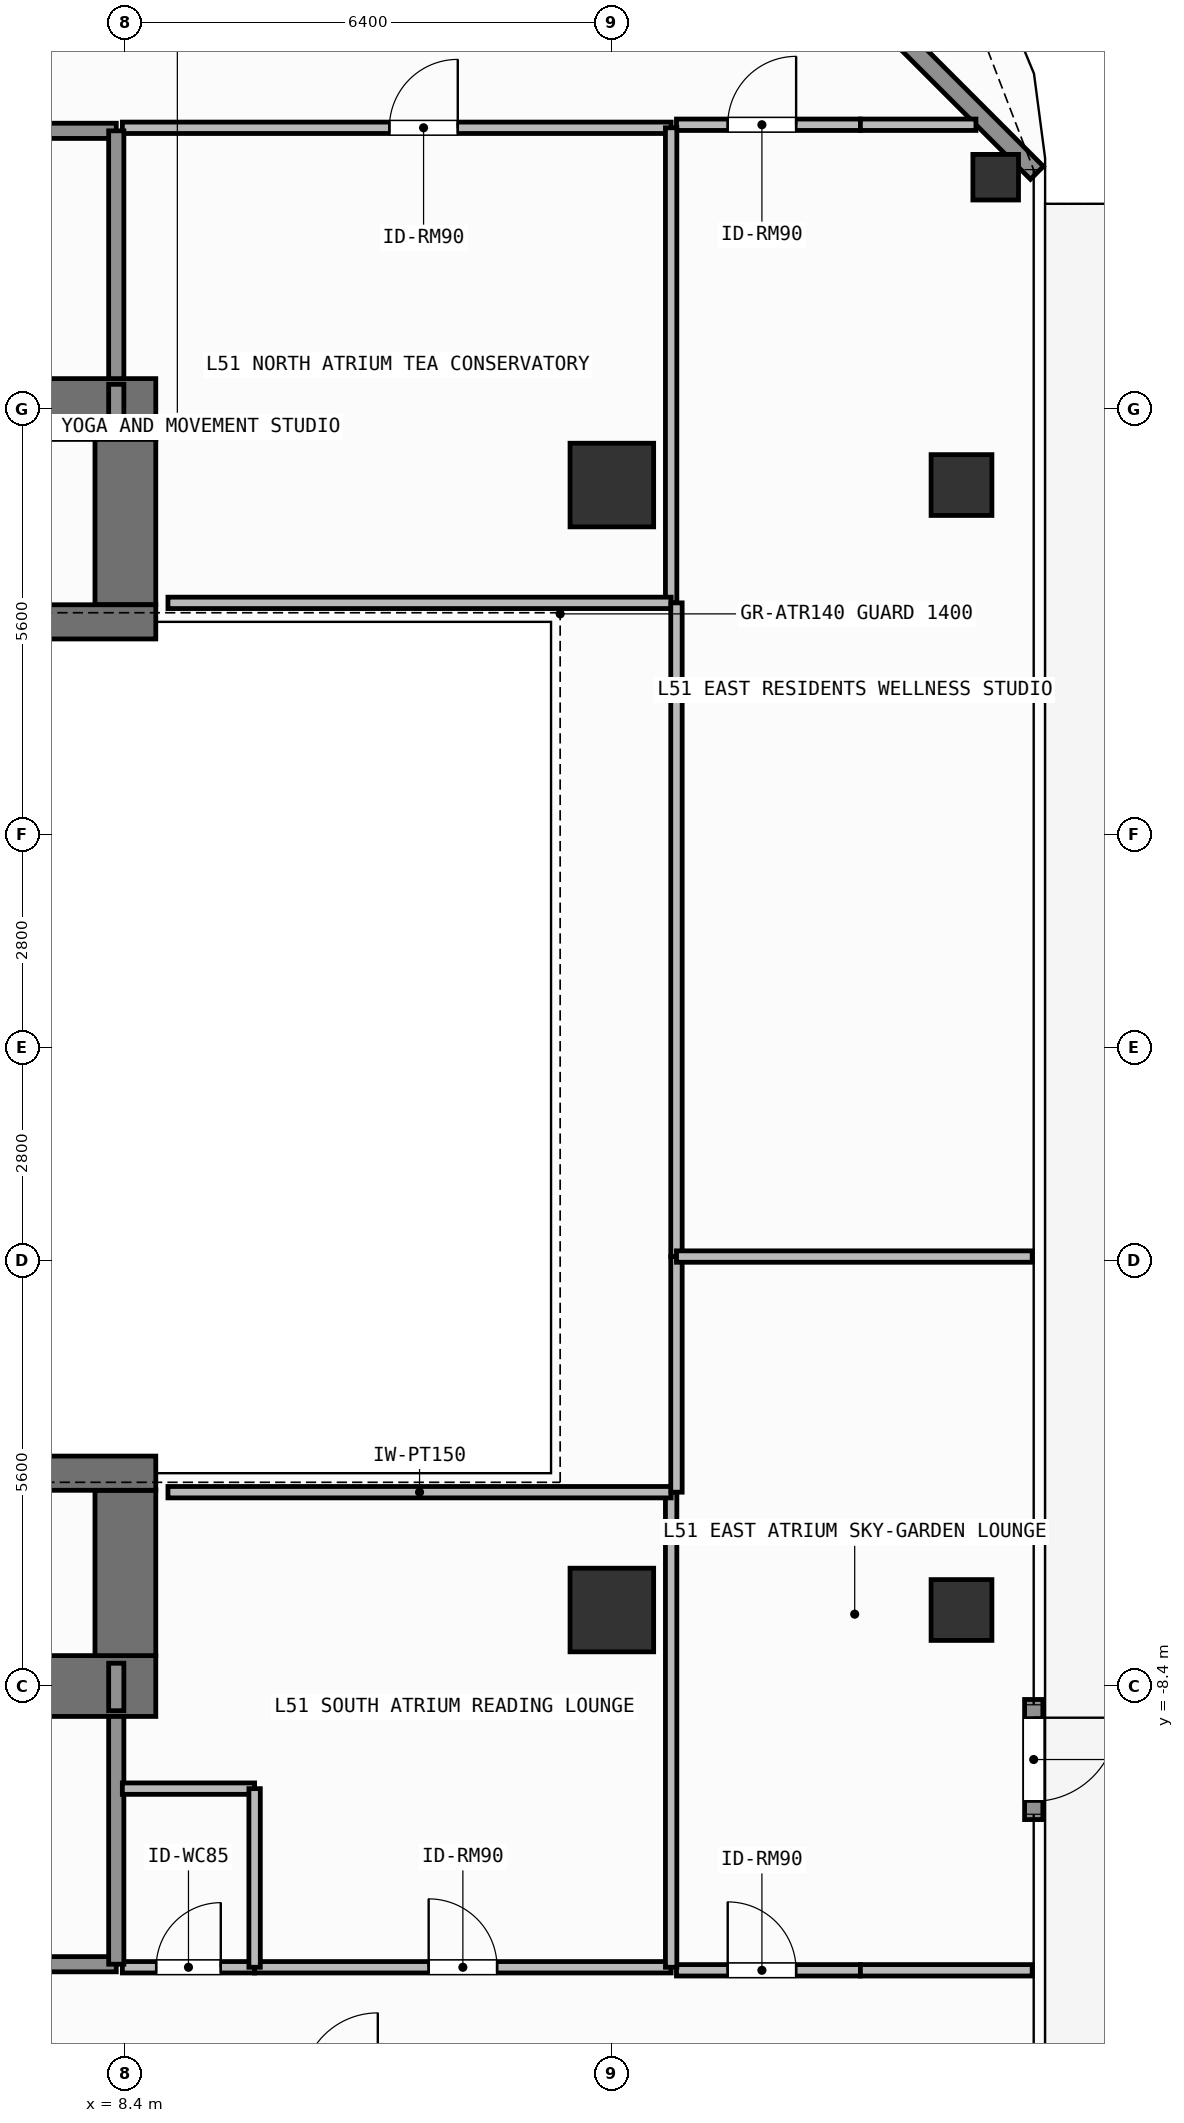
"""IFC4 building model, lengths in metres.
Left out: names, types, materials, properties, quantities, classifications, styles, units other than length and angle.
Written with IfcOpenShell. Run it as: python <this file> out.ifc"""

import sys

from ifc_helpers import new_model, si_unit, direction, frame, frame_2d, origin, origin_2d, place, context, subcontext, project, spatial, rectangle, hollow_rectangle, extrude, element, fill, save


model = new_model("IFC4")
c1 = context("Model", 3, precision=1e-05, world=origin(), true_north=direction((0.0, 1.0)))
c2 = subcontext(c1, "Body", "Model", "MODEL_VIEW")
j1 = project(units=[si_unit("LENGTHUNIT", "METRE"), si_unit("PLANEANGLEUNIT", "RADIAN")], contexts=[c1])
p1 = place(None, origin())
s1 = spatial("IfcSite", under=j1, at=p1, CompositionType="ELEMENT")
p2 = place(p1, origin())
s2 = spatial("IfcBuilding", under=s1, at=p2, CompositionType="ELEMENT")
p3 = place(p2, frame((0.0, 0.0, 207.0)))
s3 = spatial("IfcBuildingStorey", under=s2, at=p3, CompositionType="ELEMENT", Elevation=207.0)
p4 = place(p3, frame((6.12, -8.4, 0.0), z_axis=(0.0, 0.0, 1.0), x_axis=(1.0, 0.0, 0.0)))
e1 = element("IfcWall", 1, at=p4, inside=s3, PredefinedType="SHEAR", context=c2, shape_type="SweptSolid", body=[
    extrude(rectangle(XDim=2.68, YDim=0.8, at=frame_2d((1.34, 0.0))), origin(), (0.0, 0.0, 1.0), 3.9),
])
p5 = place(p3, frame((-7.55, 8.4, 0.0), z_axis=(0.0, 0.0, 1.0), x_axis=(1.0, 0.0, 0.0)))
e2 = element("IfcWall", 2, at=p5, inside=s3, PredefinedType="SHEAR", context=c2, shape_type="SweptSolid", body=[
    extrude(rectangle(XDim=16.35, YDim=0.8, at=frame_2d((8.175, 0.0))), origin(), (0.0, 0.0, 1.0), 3.9),
])
for number, where, z_axis, x_axis in (
    (3, (8.4, -8.0, 0.0), (0.0, 0.0, 1.0), (0.0, 1.0, 0.0)),
    (4, (8.4, 5.825, 0.0), (0.0, 0.0, 1.0), (0.0, 1.0, 0.0)),
):
    element("IfcWall", number, at=place(p3, frame(where, z_axis=z_axis, x_axis=x_axis)), inside=s3, PredefinedType="SHEAR", context=c2, shape_type="SweptSolid", body=[
        extrude(rectangle(XDim=2.175, YDim=0.8, at=frame_2d((1.087, 0.0))), origin(), (0.0, 0.0, 1.0), 3.9),
    ])
for number, where, z_axis, x_axis in (
    (5, (3.045, -5.6, 0.0), (0.0, 0.0, 1.0), (1.0, 0.0, 0.0)),
    (6, (3.045, 5.6, 0.0), (0.0, 0.0, 1.0), (1.0, 0.0, 0.0)),
):
    element("IfcWall", number, at=place(p3, frame(where, z_axis=z_axis, x_axis=x_axis)), inside=s3, PredefinedType="SHEAR", context=c2, shape_type="SweptSolid", body=[
        extrude(rectangle(XDim=5.755, YDim=0.45, at=frame_2d((2.877, 0.0))), origin(), (0.0, 0.0, 1.0), 3.9),
    ])
for number, where, z_axis, x_axis in (
    (7, (14.8, -7.4, 0.0), (0.0, 0.0, 1.0), (1.0, 0.0, 0.0)),
    (8, (14.8, 7.4, 0.0), (0.0, 0.0, 1.0), (1.0, 0.0, 0.0)),
):
    element("IfcColumn", number, at=place(p3, frame(where, z_axis=z_axis, x_axis=x_axis)), inside=s3, PredefinedType="COLUMN", context=c2, shape_type="SweptSolid", body=[
        extrude(rectangle(XDim=1.1, YDim=1.1, at=origin_2d()), origin(), (0.0, 0.0, 1.0), 3.9),
    ])
for number, where, z_axis, x_axis in (
    (9, (19.4, -7.4, 0.0), (0.0, 0.0, 1.0), (1.0, 0.0, 0.0)),
    (10, (19.4, 7.4, 0.0), (0.0, 0.0, 1.0), (1.0, 0.0, 0.0)),
):
    element("IfcColumn", number, at=place(p3, frame(where, z_axis=z_axis, x_axis=x_axis)), inside=s3, PredefinedType="COLUMN", context=c2, shape_type="SweptSolid", body=[
        extrude(hollow_rectangle(XDim=0.8, YDim=0.8, WallThickness=0.036, at=origin_2d()), origin(), (0.0, 0.0, 1.0), 3.9),
    ])
p6 = place(p3, frame((19.85, 11.45, 0.0), z_axis=(0.0, 0.0, 1.0), x_axis=(1.0, 0.0, 0.0)))
e11 = element("IfcColumn", 11, at=p6, inside=s3, PredefinedType="COLUMN", context=c2, shape_type="SweptSolid", body=[
    extrude(hollow_rectangle(XDim=0.6, YDim=0.6, WallThickness=0.028, at=origin_2d()), origin(), (0.0, 0.0, 1.0), 3.9),
])
p7 = place(p3, frame((20.35, -8.577, 0.0), z_axis=(0.0, 0.0, 1.0), x_axis=(0.0, -1.0, 0.0)))
e12 = element("IfcWall", 12, at=p7, inside=s3, PredefinedType="SOLIDWALL", context=c2, shape_type="SweptSolid", body=[
    extrude(rectangle(XDim=1.58, YDim=0.24, at=frame_2d((0.79, 0.0))), origin(), (0.0, 0.0, 1.0), 3.62),
])
p8 = place(p7, frame((0.24, 0.0, 0.0)))
e13 = element("IfcOpeningElement", 13, at=p8, cuts=e12, PredefinedType="OPENING", context=c2, shape_type="SweptSolid", body=[
    extrude(rectangle(XDim=1.1, YDim=2.2, at=frame_2d((0.55, 1.1))), frame((0.0, 0.13, 0.0), z_axis=(0.0, -1.0, 0.0), x_axis=(1.0, 0.0, 0.0)), (0.0, 0.0, 1.0), 0.26),
])
p9 = place(p3, frame((16.008, 15.892, 0.0), z_axis=(0.0, 0.0, 1.0), x_axis=(0.707106781187, -0.707106781187, 0.0)))
e14 = element("IfcWall", 14, at=p9, inside=s3, PredefinedType="SOLIDWALL", context=c2, shape_type="SweptSolid", body=[
    extrude(rectangle(XDim=6.201, YDim=0.24, at=frame_2d((3.101, 0.0))), origin(), (0.0, 0.0, 1.0), 3.62),
])
p10 = place(p3, frame((4.58, -12.06, 0.0), z_axis=(0.0, 0.0, 1.0), x_axis=(1.0, 0.0, 0.0)))
e15 = element("IfcWall", 15, at=p10, inside=s3, PredefinedType="SOLIDWALL", context=c2, shape_type="SweptSolid", body=[
    extrude(rectangle(XDim=3.7, YDim=0.2, at=frame_2d((1.85, 0.0))), origin(), (0.0, 0.0, 1.0), 3.62),
])
p11 = place(p10, frame((1.212, 0.0, 0.0)))
e16 = element("IfcOpeningElement", 16, at=p11, cuts=e15, PredefinedType="OPENING", context=c2, shape_type="SweptSolid", body=[
    extrude(rectangle(XDim=1.1, YDim=2.15, at=frame_2d((0.55, 1.075))), frame((0.0, 0.11, 0.0), z_axis=(0.0, -1.0, 0.0), x_axis=(1.0, 0.0, 0.0)), (0.0, 0.0, 1.0), 0.22),
])
p12 = place(p3, frame((4.58, 12.06, 0.0), z_axis=(0.0, 0.0, 1.0), x_axis=(1.0, 0.0, 0.0)))
e17 = element("IfcWall", 17, at=p12, inside=s3, PredefinedType="SOLIDWALL", context=c2, shape_type="SweptSolid", body=[
    extrude(rectangle(XDim=3.7, YDim=0.2, at=frame_2d((1.85, 0.0))), origin(), (0.0, 0.0, 1.0), 3.62),
])
p13 = place(p12, frame((1.212, 0.0, 0.0)))
e18 = element("IfcOpeningElement", 18, at=p13, cuts=e17, PredefinedType="OPENING", context=c2, shape_type="SweptSolid", body=[
    extrude(rectangle(XDim=1.1, YDim=2.15, at=frame_2d((0.55, 1.075))), frame((0.0, 0.11, 0.0), z_axis=(0.0, -1.0, 0.0), x_axis=(1.0, 0.0, 0.0)), (0.0, 0.0, 1.0), 0.22),
])
p14 = place(p3, frame((8.36, -12.1, 0.0), z_axis=(0.0, 0.0, 1.0), x_axis=(1.0, 0.0, 0.0)))
e19 = element("IfcWall", 19, at=p14, inside=s3, PredefinedType="PARTITIONING", context=c2, shape_type="SweptSolid", body=[
    extrude(rectangle(XDim=1.74, YDim=0.15, at=frame_2d((0.87, 0.0))), origin(), (0.0, 0.0, 1.0), 3.62),
])
p15 = place(p14, frame((0.445, 0.0, 0.0)))
e20 = element("IfcOpeningElement", 20, at=p15, cuts=e19, PredefinedType="OPENING", context=c2, shape_type="SweptSolid", body=[
    extrude(rectangle(XDim=0.85, YDim=2.1, at=frame_2d((0.425, 1.05))), frame((0.0, 0.085, 0.0), z_axis=(0.0, -1.0, 0.0), x_axis=(1.0, 0.0, 0.0)), (0.0, 0.0, 1.0), 0.17),
])
p16 = place(p3, frame((10.1, -12.1, 0.0), z_axis=(0.0, 0.0, 1.0), x_axis=(1.0, 0.0, 0.0)))
e21 = element("IfcWall", 21, at=p16, inside=s3, PredefinedType="PARTITIONING", context=c2, shape_type="SweptSolid", body=[
    extrude(rectangle(XDim=5.48, YDim=0.15, at=frame_2d((2.74, 0.0))), origin(), (0.0, 0.0, 1.0), 3.62),
])
p17 = place(p16, frame((2.29, 0.0, 0.0)))
e22 = element("IfcOpeningElement", 22, at=p17, cuts=e21, PredefinedType="OPENING", context=c2, shape_type="SweptSolid", body=[
    extrude(rectangle(XDim=0.9, YDim=2.1, at=frame_2d((0.45, 1.05))), frame((0.0, 0.085, 0.0), z_axis=(0.0, -1.0, 0.0), x_axis=(1.0, 0.0, 0.0)), (0.0, 0.0, 1.0), 0.17),
])
p18 = place(p3, frame((8.36, 12.1, 0.0), z_axis=(0.0, 0.0, 1.0), x_axis=(1.0, 0.0, 0.0)))
e23 = element("IfcWall", 23, at=p18, inside=s3, PredefinedType="PARTITIONING", context=c2, shape_type="SweptSolid", body=[
    extrude(rectangle(XDim=7.22, YDim=0.15, at=frame_2d((3.61, 0.0))), origin(), (0.0, 0.0, 1.0), 3.62),
])
p19 = place(p18, frame((3.513, 0.0, 0.0)))
e24 = element("IfcOpeningElement", 24, at=p19, cuts=e23, PredefinedType="OPENING", context=c2, shape_type="SweptSolid", body=[
    extrude(rectangle(XDim=0.9, YDim=2.1, at=frame_2d((0.45, 1.05))), frame((0.0, 0.085, 0.0), z_axis=(0.0, -1.0, 0.0), x_axis=(1.0, 0.0, 0.0)), (0.0, 0.0, 1.0), 0.17),
])
p20 = place(p3, frame((15.65, -12.14, 0.0), z_axis=(0.0, 0.0, 1.0), x_axis=(1.0, 0.0, 0.0)))
e25 = element("IfcWall", 25, at=p20, inside=s3, PredefinedType="PARTITIONING", context=c2, shape_type="SweptSolid", body=[
    extrude(rectangle(XDim=2.42, YDim=0.15, at=frame_2d((1.21, 0.0))), origin(), (0.0, 0.0, 1.0), 3.62),
])
p21 = place(p20, frame((0.674, 0.0, 0.0)))
e26 = element("IfcOpeningElement", 26, at=p21, cuts=e25, PredefinedType="OPENING", context=c2, shape_type="SweptSolid", body=[
    extrude(rectangle(XDim=0.9, YDim=2.1, at=frame_2d((0.45, 1.05))), frame((0.0, 0.085, 0.0), z_axis=(0.0, -1.0, 0.0), x_axis=(1.0, 0.0, 0.0)), (0.0, 0.0, 1.0), 0.17),
])
p22 = place(p3, frame((15.65, 12.14, 0.0), z_axis=(0.0, 0.0, 1.0), x_axis=(1.0, 0.0, 0.0)))
e27 = element("IfcWall", 27, at=p22, inside=s3, PredefinedType="PARTITIONING", context=c2, shape_type="SweptSolid", body=[
    extrude(rectangle(XDim=2.42, YDim=0.15, at=frame_2d((1.21, 0.0))), origin(), (0.0, 0.0, 1.0), 3.62),
])
p23 = place(p22, frame((0.674, 0.0, 0.0)))
e28 = element("IfcOpeningElement", 28, at=p23, cuts=e27, PredefinedType="OPENING", context=c2, shape_type="SweptSolid", body=[
    extrude(rectangle(XDim=0.9, YDim=2.1, at=frame_2d((0.45, 1.05))), frame((0.0, 0.085, 0.0), z_axis=(0.0, -1.0, 0.0), x_axis=(1.0, 0.0, 0.0)), (0.0, 0.0, 1.0), 0.17),
])
for number, where, z_axis, x_axis in (
    (29, (8.28, -12.06, 0.0), (0.0, 0.0, 1.0), (0.0, 1.0, 0.0)),
    (30, (8.28, 8.8, 0.0), (0.0, 0.0, 1.0), (0.0, 1.0, 0.0)),
):
    element("IfcWall", number, at=place(p3, frame(where, z_axis=z_axis, x_axis=x_axis)), inside=s3, PredefinedType="SOLIDWALL", context=c2, shape_type="SweptSolid", body=[
        extrude(rectangle(XDim=3.26, YDim=0.2, at=frame_2d((1.63, 0.0))), origin(), (0.0, 0.0, 1.0), 3.62),
    ])
p24 = place(p3, frame((8.28, -8.725, 0.0), z_axis=(0.0, 0.0, 1.0), x_axis=(0.0, 1.0, 0.0)))
e31 = element("IfcWall", 31, at=p24, inside=s3, PredefinedType="SOLIDWALL", context=c2, shape_type="SweptSolid", body=[
    extrude(rectangle(XDim=0.625, YDim=0.2, at=frame_2d((0.312, 0.0))), origin(), (0.0, 0.0, 1.0), 3.62),
])
p25 = place(p3, frame((8.36, -9.75, 0.0), z_axis=(0.0, 0.0, 1.0), x_axis=(1.0, 0.0, 0.0)))
e32 = element("IfcWall", 32, at=p25, inside=s3, PredefinedType="PARTITIONING", context=c2, shape_type="SweptSolid", body=[
    extrude(rectangle(XDim=1.74, YDim=0.15, at=frame_2d((0.87, 0.0))), origin(), (0.0, 0.0, 1.0), 3.62),
])
p26 = place(p3, frame((10.1, -12.1, 0.0), z_axis=(0.0, 0.0, 1.0), x_axis=(0.0, 1.0, 0.0)))
e33 = element("IfcWall", 33, at=p26, inside=s3, PredefinedType="PARTITIONING", context=c2, shape_type="SweptSolid", body=[
    extrude(rectangle(XDim=2.35, YDim=0.15, at=frame_2d((1.175, 0.0))), origin(), (0.0, 0.0, 1.0), 3.62),
])
p27 = place(p3, frame((15.58, -12.1, 0.0), z_axis=(0.0, 0.0, 1.0), x_axis=(0.0, 1.0, 0.0)))
e34 = element("IfcWall", 34, at=p27, inside=s3, PredefinedType="PARTITIONING", context=c2, shape_type="SweptSolid", body=[
    extrude(rectangle(XDim=6.25, YDim=0.15, at=frame_2d((3.125, 0.0))), origin(), (0.0, 0.0, 1.0), 3.62),
])
p28 = place(p3, frame((8.96, -5.85, 0.0), z_axis=(0.0, 0.0, 1.0), x_axis=(1.0, 0.0, 0.0)))
e35 = element("IfcWall", 35, at=p28, inside=s3, PredefinedType="PARTITIONING", context=c2, shape_type="SweptSolid", body=[
    extrude(rectangle(XDim=6.62, YDim=0.15, at=frame_2d((3.31, 0.0))), origin(), (0.0, 0.0, 1.0), 3.62),
])
p29 = place(p3, frame((8.28, 8.1, 0.0), z_axis=(0.0, 0.0, 1.0), x_axis=(0.0, 1.0, 0.0)))
e36 = element("IfcWall", 36, at=p29, inside=s3, PredefinedType="SOLIDWALL", context=c2, shape_type="SweptSolid", body=[
    extrude(rectangle(XDim=0.625, YDim=0.2, at=frame_2d((0.312, 0.0))), origin(), (0.0, 0.0, 1.0), 3.62),
])
p30 = place(p3, frame((15.58, 5.85, 0.0), z_axis=(0.0, 0.0, 1.0), x_axis=(0.0, 1.0, 0.0)))
e37 = element("IfcWall", 37, at=p30, inside=s3, PredefinedType="PARTITIONING", context=c2, shape_type="SweptSolid", body=[
    extrude(rectangle(XDim=6.25, YDim=0.15, at=frame_2d((3.125, 0.0))), origin(), (0.0, 0.0, 1.0), 3.62),
])
p31 = place(p3, frame((8.96, 5.85, 0.0), z_axis=(0.0, 0.0, 1.0), x_axis=(1.0, 0.0, 0.0)))
e38 = element("IfcWall", 38, at=p31, inside=s3, PredefinedType="PARTITIONING", context=c2, shape_type="SweptSolid", body=[
    extrude(rectangle(XDim=6.62, YDim=0.15, at=frame_2d((3.31, 0.0))), origin(), (0.0, 0.0, 1.0), 3.62),
])
p32 = place(p3, frame((15.65, -5.85, 0.0), z_axis=(0.0, 0.0, 1.0), x_axis=(0.0, 1.0, 0.0)))
e39 = element("IfcWall", 39, at=p32, inside=s3, PredefinedType="PARTITIONING", context=c2, shape_type="SweptSolid", body=[
    extrude(rectangle(XDim=3.1, YDim=0.15, at=frame_2d((1.55, 0.0))), origin(), (0.0, 0.0, 1.0), 3.62),
])
p33 = place(p3, frame((15.65, -2.75, 0.0), z_axis=(0.0, 0.0, 1.0), x_axis=(0.0, 1.0, 0.0)))
e40 = element("IfcWall", 40, at=p33, inside=s3, PredefinedType="PARTITIONING", context=c2, shape_type="SweptSolid", body=[
    extrude(rectangle(XDim=8.6, YDim=0.15, at=frame_2d((4.3, 0.0))), origin(), (0.0, 0.0, 1.0), 3.62),
])
p34 = place(p3, frame((15.65, -2.75, 0.0), z_axis=(0.0, 0.0, 1.0), x_axis=(1.0, 0.0, 0.0)))
e41 = element("IfcWall", 41, at=p34, inside=s3, PredefinedType="PARTITIONING", context=c2, shape_type="SweptSolid", body=[
    extrude(rectangle(XDim=4.68, YDim=0.15, at=frame_2d((2.34, 0.0))), origin(), (0.0, 0.0, 1.0), 3.62),
])
p35 = place(p3, frame((18.07, -12.14, 0.0), z_axis=(0.0, 0.0, 1.0), x_axis=(1.0, 0.0, 0.0)))
e42 = element("IfcWall", 42, at=p35, inside=s3, PredefinedType="PARTITIONING", context=c2, shape_type="SweptSolid", body=[
    extrude(rectangle(XDim=2.26, YDim=0.15, at=frame_2d((1.13, 0.0))), origin(), (0.0, 0.0, 1.0), 3.62),
])
p36 = place(p3, frame((18.07, 12.14, 0.0), z_axis=(0.0, 0.0, 1.0), x_axis=(1.0, 0.0, 0.0)))
e43 = element("IfcWall", 43, at=p36, inside=s3, PredefinedType="PARTITIONING", context=c2, shape_type="SweptSolid", body=[
    extrude(rectangle(XDim=1.52, YDim=0.15, at=frame_2d((0.76, 0.0))), origin(), (0.0, 0.0, 1.0), 3.62),
])
p37 = place(p8, origin())
e44 = element("IfcDoor", 44, at=p37, inside=s3, OperationType="SINGLE_SWING_LEFT", PredefinedType="DOOR", context=c2, shape_type="SweptSolid", body=[
    extrude(rectangle(XDim=1.1, YDim=2.2, at=frame_2d((0.55, 1.1))), frame((0.0, 0.025, 0.0), z_axis=(0.0, -1.0, 0.0), x_axis=(1.0, 0.0, 0.0)), (0.0, 0.0, 1.0), 0.05),
])
fill(e13, e44)
p38 = place(p15, origin())
e45 = element("IfcDoor", 45, at=p38, inside=s3, OperationType="SINGLE_SWING_RIGHT", PredefinedType="DOOR", context=c2, shape_type="SweptSolid", body=[
    extrude(rectangle(XDim=0.85, YDim=2.1, at=frame_2d((0.425, 1.05))), frame((0.0, 0.025, 0.0), z_axis=(0.0, -1.0, 0.0), x_axis=(1.0, 0.0, 0.0)), (0.0, 0.0, 1.0), 0.05),
])
fill(e20, e45)
p39 = place(p17, origin())
e46 = element("IfcDoor", 46, at=p39, inside=s3, OperationType="SINGLE_SWING_LEFT", PredefinedType="DOOR", context=c2, shape_type="SweptSolid", body=[
    extrude(rectangle(XDim=0.9, YDim=2.1, at=frame_2d((0.45, 1.05))), frame((0.0, 0.025, 0.0), z_axis=(0.0, -1.0, 0.0), x_axis=(1.0, 0.0, 0.0)), (0.0, 0.0, 1.0), 0.05),
])
fill(e22, e46)
p40 = place(p19, origin())
e47 = element("IfcDoor", 47, at=p40, inside=s3, OperationType="SINGLE_SWING_RIGHT", PredefinedType="DOOR", context=c2, shape_type="SweptSolid", body=[
    extrude(rectangle(XDim=0.9, YDim=2.1, at=frame_2d((0.45, 1.05))), frame((0.0, 0.025, 0.0), z_axis=(0.0, -1.0, 0.0), x_axis=(1.0, 0.0, 0.0)), (0.0, 0.0, 1.0), 0.05),
])
fill(e24, e47)
p41 = place(p21, origin())
e48 = element("IfcDoor", 48, at=p41, inside=s3, OperationType="SINGLE_SWING_LEFT", PredefinedType="DOOR", context=c2, shape_type="SweptSolid", body=[
    extrude(rectangle(XDim=0.9, YDim=2.1, at=frame_2d((0.45, 1.05))), frame((0.0, 0.025, 0.0), z_axis=(0.0, -1.0, 0.0), x_axis=(1.0, 0.0, 0.0)), (0.0, 0.0, 1.0), 0.05),
])
fill(e26, e48)
p42 = place(p23, origin())
e49 = element("IfcDoor", 49, at=p42, inside=s3, OperationType="SINGLE_SWING_RIGHT", PredefinedType="DOOR", context=c2, shape_type="SweptSolid", body=[
    extrude(rectangle(XDim=0.9, YDim=2.1, at=frame_2d((0.45, 1.05))), frame((0.0, 0.025, 0.0), z_axis=(0.0, -1.0, 0.0), x_axis=(1.0, 0.0, 0.0)), (0.0, 0.0, 1.0), 0.05),
])
fill(e28, e49)
save(model, sys.argv[1])
